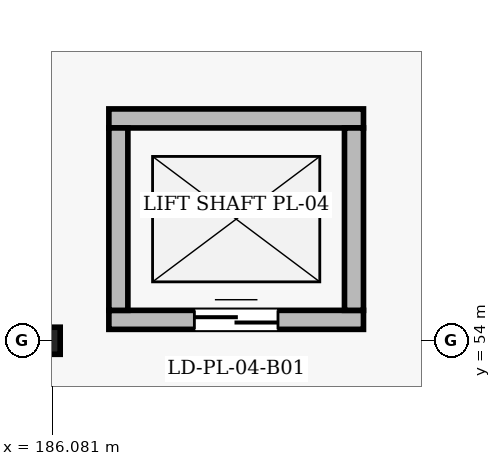
"""IFC4 building model, lengths in metres.
Left out: names, types, materials, properties, quantities, classifications, styles, units other than length and angle.
Written with IfcOpenShell. Run it as: python <this file> out.ifc"""

import sys

from ifc_helpers import new_model, si_unit, direction, frame, frame_2d, origin, origin_2d, place, context, subcontext, project, spatial, rectangle, i_section, extrude, element, fill, save


model = new_model("IFC4")
c1 = context("Model", 3, precision=1e-05, world=origin(), true_north=direction((0.0, 1.0)))
c2 = subcontext(c1, "Body", "Model", "MODEL_VIEW")
j1 = project(units=[si_unit("LENGTHUNIT", "METRE"), si_unit("PLANEANGLEUNIT", "RADIAN")], contexts=[c1])
p1 = place(None, origin())
s1 = spatial("IfcSite", under=j1, at=p1, CompositionType="ELEMENT")
p2 = place(p1, origin())
s2 = spatial("IfcBuilding", under=s1, at=p2, CompositionType="ELEMENT")
p3 = place(p2, frame((0.0, 0.0, -5.4)))
s3 = spatial("IfcBuildingStorey", under=s2, at=p3, CompositionType="ELEMENT", Elevation=-5.4)
p4 = place(p3, frame((186.0, 54.0, 0.0), z_axis=(0.0, 0.0, 1.0), x_axis=(1.0, 0.0, 0.0)))
e1 = element("IfcColumn", 1, at=p4, inside=s3, PredefinedType="COLUMN", context=c2, shape_type="SweptSolid", body=[
    extrude(i_section(OverallWidth=0.369, OverallDepth=0.356, WebThickness=0.011, FlangeThickness=0.018, FilletRadius=0.015, at=origin_2d()), origin(), (0.0, 0.0, 1.0), 5.4),
])
p5 = place(p3, frame((186.825, 54.275, 0.0), z_axis=(0.0, 0.0, 1.0), x_axis=(1.0, 0.0, 0.0)))
e2 = element("IfcWall", 2, at=p5, inside=s3, PredefinedType="SOLIDWALL", context=c2, shape_type="SweptSolid", body=[
    extrude(rectangle(XDim=3.35, YDim=0.25, at=frame_2d((1.675, 0.0))), origin(), (0.0, 0.0, 1.0), 4.494),
])
p6 = place(p5, frame((1.125, 0.0, 0.0)))
e3 = element("IfcOpeningElement", 3, at=p6, cuts=e2, PredefinedType="OPENING", context=c2, shape_type="SweptSolid", body=[
    extrude(rectangle(XDim=1.1, YDim=2.2, at=frame_2d((0.55, 1.1))), frame((0.0, 0.135, 0.0), z_axis=(0.0, -1.0, 0.0), x_axis=(1.0, 0.0, 0.0)), (0.0, 0.0, 1.0), 0.27),
])
p7 = place(p3, frame((190.175, 56.925, 0.0), z_axis=(0.0, 0.0, 1.0), x_axis=(-1.0, 0.0, 0.0)))
e4 = element("IfcWall", 4, at=p7, inside=s3, PredefinedType="SOLIDWALL", context=c2, shape_type="SweptSolid", body=[
    extrude(rectangle(XDim=3.35, YDim=0.25, at=frame_2d((1.675, 0.0))), origin(), (0.0, 0.0, 1.0), 4.817),
])
for number, where, z_axis, x_axis in (
    (5, (186.95, 56.8, 0.0), (0.0, 0.0, 1.0), (0.0, -1.0, 0.0)),
    (6, (190.05, 54.4, 0.0), (0.0, 0.0, 1.0), (0.0, 1.0, 0.0)),
):
    element("IfcWall", number, at=place(p3, frame(where, z_axis=z_axis, x_axis=x_axis)), inside=s3, PredefinedType="SOLIDWALL", context=c2, shape_type="SweptSolid", body=[
        extrude(rectangle(XDim=2.4, YDim=0.25, at=frame_2d((1.2, 0.0))), origin(), (0.0, 0.0, 1.0), 4.494),
    ])
p8 = place(p6, origin())
e7 = element("IfcDoor", 7, at=p8, inside=s3, OperationType="DOUBLE_DOOR_SLIDING", PredefinedType="DOOR", context=c2, shape_type="SweptSolid", body=[
    extrude(rectangle(XDim=1.1, YDim=2.2, at=frame_2d((0.55, 1.1))), frame((0.0, 0.025, 0.0), z_axis=(0.0, -1.0, 0.0), x_axis=(1.0, 0.0, 0.0)), (0.0, 0.0, 1.0), 0.05),
])
fill(e3, e7)
save(model, sys.argv[1])
